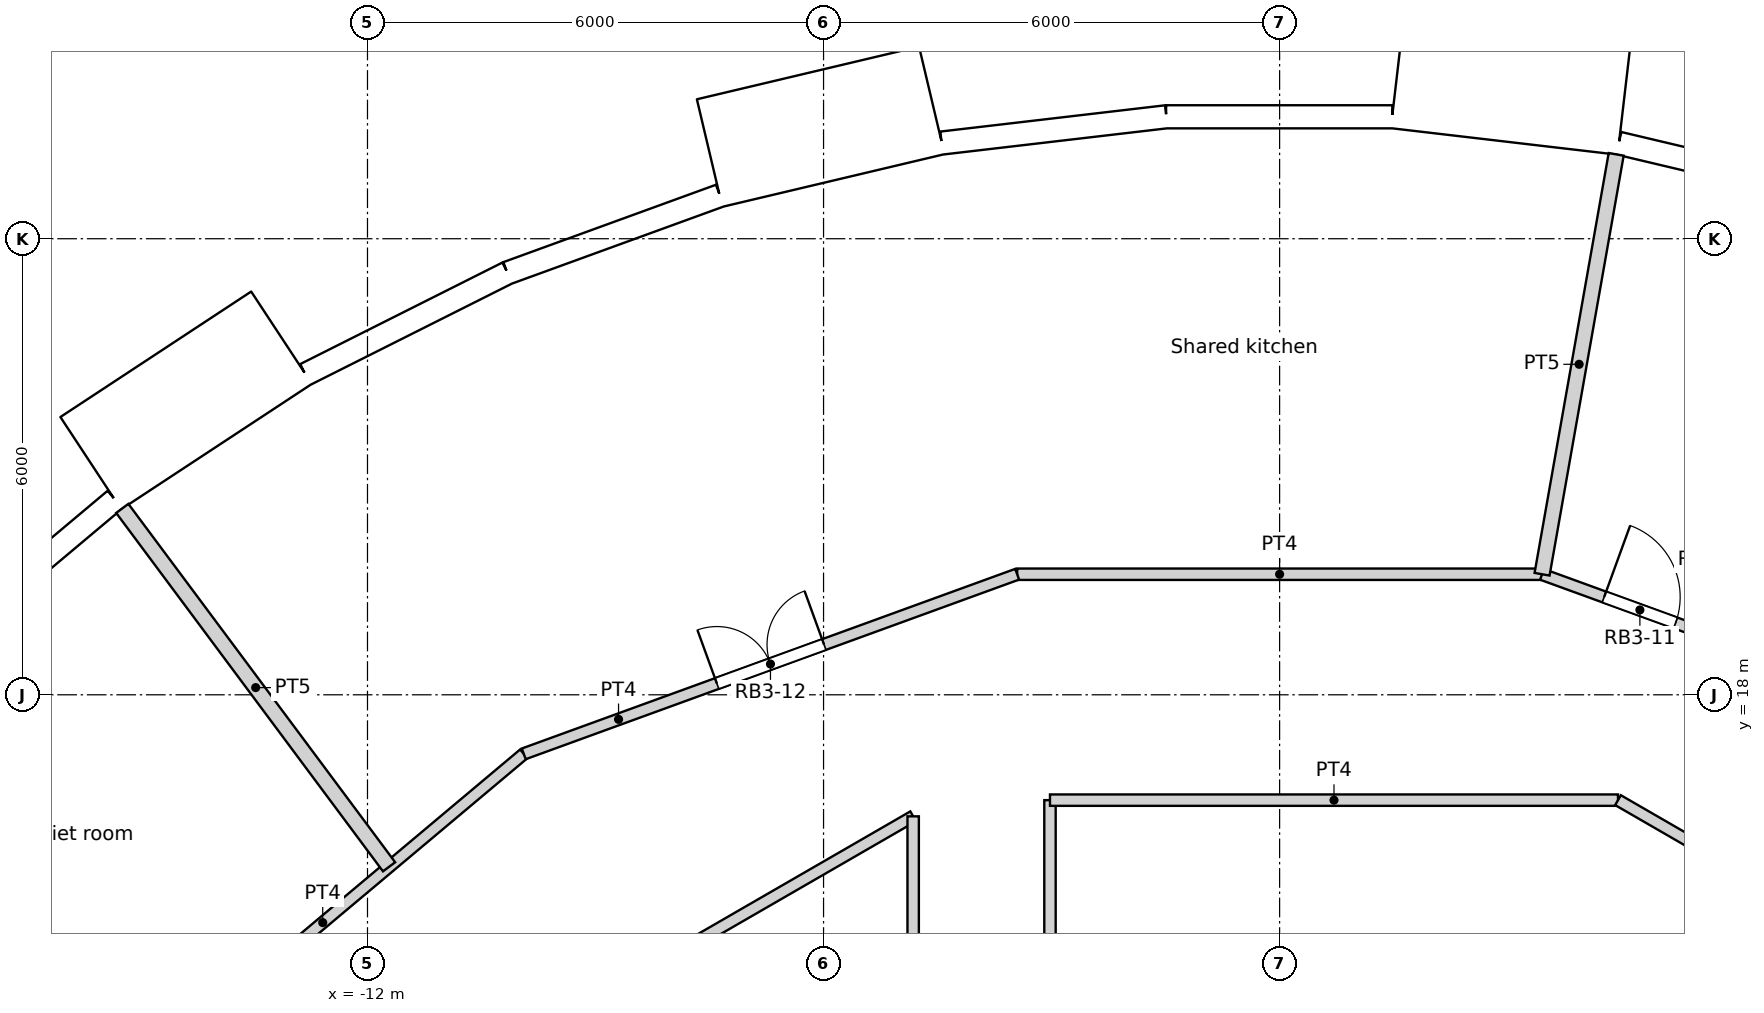
"""IFC4 building model, lengths in metres.
Left out: names, types, materials, properties, quantities, classifications, styles, units other than length and angle.
Written with IfcOpenShell. Run it as: python <this file> out.ifc"""

import sys

from ifc_helpers import new_model, si_unit, direction, frame, frame_2d, origin, origin_2d, place, context, subcontext, project, spatial, rectangle, circle, extrude, element, fill, save


model = new_model("IFC4")
c1 = context("Model", 3, precision=1e-05, world=origin(), true_north=direction((0.0, 1.0)))
c2 = subcontext(c1, "Body", "Model", "MODEL_VIEW")
j1 = project(units=[si_unit("LENGTHUNIT", "METRE"), si_unit("PLANEANGLEUNIT", "RADIAN")], contexts=[c1])
p1 = place(None, origin())
s1 = spatial("IfcSite", under=j1, at=p1, CompositionType="ELEMENT")
p2 = place(p1, origin())
s2 = spatial("IfcBuilding", under=s1, at=p2, CompositionType="ELEMENT")
p3 = place(p2, frame((0.0, 0.0, 147.6)))
s3 = spatial("IfcBuildingStorey", under=s2, at=p3, CompositionType="ELEMENT", Elevation=147.6)
for number, where, z_axis, x_axis in (
    (1, (4.263, 24.175, 0.0), (0.0, 0.0, 1.0), (1.0, 0.0, 0.0)),
    (2, (-1.427, 24.506, 0.0), (0.0, 0.0, 1.0), (1.0, 0.0, 0.0)),
    (3, (-7.04, 23.516, 0.0), (0.0, 0.0, 1.0), (1.0, 0.0, 0.0)),
    (4, (-12.274, 21.259, 0.0), (0.0, 0.0, 1.0), (1.0, 0.0, 0.0)),
):
    element("IfcColumn", number, at=place(p3, frame(where, z_axis=z_axis, x_axis=x_axis)), inside=s3, PredefinedType="COLUMN", context=c2, shape_type="SweptSolid", body=[
        extrude(circle(Radius=0.6, at=origin_2d()), origin(), (0.0, 0.0, 1.0), 3.6),
    ])
for number, where, z_axis, x_axis in (
    (5, (1.406, 18.77, 0.0), (0.0, 0.0, 1.0), (1.0, 0.0, 0.0)),
    (6, (-4.188, 18.35, 0.0), (0.0, 0.0, 1.0), (1.0, 0.0, 0.0)),
    (7, (-9.411, 16.301, 0.0), (0.0, 0.0, 1.0), (1.0, 0.0, 0.0)),
):
    element("IfcColumn", number, at=place(p3, frame(where, z_axis=z_axis, x_axis=x_axis)), inside=s3, PredefinedType="COLUMN", context=c2, shape_type="SweptSolid", body=[
        extrude(circle(Radius=0.65, at=origin_2d()), origin(), (0.0, 0.0, 1.0), 3.6),
    ])
p4 = place(p3, frame((7.356, 24.57, 0.0), z_axis=(0.0, 0.0, 1.0), x_axis=(-0.973045378923, 0.230613725862, 0.0)))
e8 = element("IfcWall", 8, at=p4, inside=s3, PredefinedType="SOLIDWALL", context=c2, shape_type="SweptSolid", body=[
    extrude(rectangle(XDim=2.973, YDim=0.3, at=frame_2d((1.486, 0.0))), origin(), (0.0, 0.0, 1.0), 3.3),
])
p5 = place(p4, frame((1.486, 0.0, 1.55)))
e9 = element("IfcOpeningElement", 9, at=p5, cuts=e8, PredefinedType="OPENING", context=c2, shape_type="SweptSolid", body=[
    extrude(circle(Radius=0.9, at=origin_2d()), frame((0.0, 0.16, 0.0), z_axis=(0.0, -1.0, 0.0), x_axis=(1.0, 0.0, 0.0)), (0.0, 0.0, 1.0), 0.32),
])
p6 = place(p3, frame((4.529, 25.828, -0.3), z_axis=(0.0, 0.0, 1.0), x_axis=(-0.9932342274, 0.116128246006, 0.0)))
e10 = element("IfcWall", 10, at=p6, inside=s3, PredefinedType="ELEMENTEDWALL", context=c2, shape_type="SweptSolid", body=[
    extrude(rectangle(XDim=3.0, YDim=1.45, at=frame_2d((1.5, 0.0))), origin(), (0.0, 0.0, 1.0), 3.6),
])
p7 = place(p6, frame((1.5, 0.0, 1.85)))
e11 = element("IfcOpeningElement", 11, at=p7, cuts=e10, PredefinedType="OPENING", context=c2, shape_type="SweptSolid", body=[
    extrude(circle(Radius=0.9, at=origin_2d()), frame((0.0, 0.735, 0.0), z_axis=(0.0, -1.0, 0.0), x_axis=(1.0, 0.0, 0.0)), (0.0, 0.0, 1.0), 1.47),
])
p8 = place(p3, frame((1.482, 25.604, 0.0), z_axis=(0.0, 0.0, 1.0), x_axis=(-1.0, 0.0, 0.0)))
e12 = element("IfcWall", 12, at=p8, inside=s3, PredefinedType="SOLIDWALL", context=c2, shape_type="SweptSolid", body=[
    extrude(rectangle(XDim=2.973, YDim=0.3, at=frame_2d((1.486, 0.0))), origin(), (0.0, 0.0, 1.0), 3.3),
])
p9 = place(p8, frame((1.486, 0.0, 1.55)))
e13 = element("IfcOpeningElement", 13, at=p9, cuts=e12, PredefinedType="OPENING", context=c2, shape_type="SweptSolid", body=[
    extrude(circle(Radius=0.9, at=origin_2d()), frame((0.0, 0.16, 0.0), z_axis=(0.0, -1.0, 0.0), x_axis=(1.0, 0.0, 0.0)), (0.0, 0.0, 1.0), 0.32),
])
p10 = place(p3, frame((-1.491, 25.604, 0.0), z_axis=(0.0, 0.0, 1.0), x_axis=(-0.993245010522, -0.1160359818, 0.0)))
e14 = element("IfcWall", 14, at=p10, inside=s3, PredefinedType="SOLIDWALL", context=c2, shape_type="SweptSolid", body=[
    extrude(rectangle(XDim=2.973, YDim=0.3, at=frame_2d((1.486, 0.0))), origin(), (0.0, 0.0, 1.0), 3.3),
])
p11 = place(p10, frame((1.486, 0.0, 1.55)))
e15 = element("IfcOpeningElement", 15, at=p11, cuts=e14, PredefinedType="OPENING", context=c2, shape_type="SweptSolid", body=[
    extrude(circle(Radius=0.9, at=origin_2d()), frame((0.0, 0.16, 0.0), z_axis=(0.0, -1.0, 0.0), x_axis=(1.0, 0.0, 0.0)), (0.0, 0.0, 1.0), 0.32),
])
p12 = place(p3, frame((-4.578, 25.819, -0.3), z_axis=(0.0, 0.0, 1.0), x_axis=(-0.973042333261, -0.23062657627, 0.0)))
e16 = element("IfcWall", 16, at=p12, inside=s3, PredefinedType="ELEMENTEDWALL", context=c2, shape_type="SweptSolid", body=[
    extrude(rectangle(XDim=3.0, YDim=1.45, at=frame_2d((1.5, 0.0))), origin(), (0.0, 0.0, 1.0), 3.6),
])
p13 = place(p12, frame((1.5, 0.0, 1.85)))
e17 = element("IfcOpeningElement", 17, at=p13, cuts=e16, PredefinedType="OPENING", context=c2, shape_type="SweptSolid", body=[
    extrude(circle(Radius=0.9, at=origin_2d()), frame((0.0, 0.735, 0.0), z_axis=(0.0, -1.0, 0.0), x_axis=(1.0, 0.0, 0.0)), (0.0, 0.0, 1.0), 1.47),
])
p14 = place(p3, frame((-7.365, 24.567, 0.0), z_axis=(0.0, 0.0, 1.0), x_axis=(-0.939690282133, -0.342026568652, 0.0)))
e18 = element("IfcWall", 18, at=p14, inside=s3, PredefinedType="SOLIDWALL", context=c2, shape_type="SweptSolid", body=[
    extrude(rectangle(XDim=2.973, YDim=0.3, at=frame_2d((1.486, 0.0))), origin(), (0.0, 0.0, 1.0), 3.3),
])
p15 = place(p14, frame((1.486, 0.0, 1.55)))
e19 = element("IfcOpeningElement", 19, at=p15, cuts=e18, PredefinedType="OPENING", context=c2, shape_type="SweptSolid", body=[
    extrude(circle(Radius=0.9, at=origin_2d()), frame((0.0, 0.16, 0.0), z_axis=(0.0, -1.0, 0.0), x_axis=(1.0, 0.0, 0.0)), (0.0, 0.0, 1.0), 0.32),
])
p16 = place(p3, frame((-10.158, 23.55, 0.0), z_axis=(0.0, 0.0, 1.0), x_axis=(-0.893637442555, -0.448789618045, 0.0)))
e20 = element("IfcWall", 20, at=p16, inside=s3, PredefinedType="SOLIDWALL", context=c2, shape_type="SweptSolid", body=[
    extrude(rectangle(XDim=2.973, YDim=0.3, at=frame_2d((1.486, 0.0))), origin(), (0.0, 0.0, 1.0), 3.3),
])
p17 = place(p16, frame((1.486, 0.0, 1.55)))
e21 = element("IfcOpeningElement", 21, at=p17, cuts=e20, PredefinedType="OPENING", context=c2, shape_type="SweptSolid", body=[
    extrude(circle(Radius=0.9, at=origin_2d()), frame((0.0, 0.16, 0.0), z_axis=(0.0, -1.0, 0.0), x_axis=(1.0, 0.0, 0.0)), (0.0, 0.0, 1.0), 0.32),
])
p18 = place(p3, frame((-13.132, 22.697, -0.3), z_axis=(0.0, 0.0, 1.0), x_axis=(-0.835514416706, -0.549468524554, 0.0)))
e22 = element("IfcWall", 22, at=p18, inside=s3, PredefinedType="ELEMENTEDWALL", context=c2, shape_type="SweptSolid", body=[
    extrude(rectangle(XDim=3.0, YDim=1.45, at=frame_2d((1.5, 0.0))), origin(), (0.0, 0.0, 1.0), 3.6),
])
p19 = place(p18, frame((1.5, 0.0, 1.85)))
e23 = element("IfcOpeningElement", 23, at=p19, cuts=e22, PredefinedType="OPENING", context=c2, shape_type="SweptSolid", body=[
    extrude(circle(Radius=0.9, at=origin_2d()), frame((0.0, 0.735, 0.0), z_axis=(0.0, -1.0, 0.0), x_axis=(1.0, 0.0, 0.0)), (0.0, 0.0, 1.0), 1.47),
])
p20 = place(p3, frame((-15.323, 20.566, 0.0), z_axis=(0.0, 0.0, 1.0), x_axis=(-0.766049350637, -0.642781761089, 0.0)))
e24 = element("IfcWall", 24, at=p20, inside=s3, PredefinedType="SOLIDWALL", context=c2, shape_type="SweptSolid", body=[
    extrude(rectangle(XDim=2.973, YDim=0.3, at=frame_2d((1.486, 0.0))), origin(), (0.0, 0.0, 1.0), 3.3),
])
p21 = place(p20, frame((1.486, 0.0, 1.55)))
e25 = element("IfcOpeningElement", 25, at=p21, cuts=e24, PredefinedType="OPENING", context=c2, shape_type="SweptSolid", body=[
    extrude(circle(Radius=0.9, at=origin_2d()), frame((0.0, 0.16, 0.0), z_axis=(0.0, -1.0, 0.0), x_axis=(1.0, 0.0, 0.0)), (0.0, 0.0, 1.0), 0.32),
])
p22 = place(p3, frame((-4.821, 10.3, 0.0), z_axis=(0.0, 0.0, 1.0), x_axis=(0.0, 1.0, 0.0)))
e26 = element("IfcWall", 26, at=p22, inside=s3, PredefinedType="PARTITIONING", context=c2, shape_type="SweptSolid", body=[
    extrude(rectangle(XDim=6.101, YDim=0.15, at=frame_2d((3.05, 0.0))), origin(), (0.0, 0.0, 1.0), 3.3),
])
p23 = place(p3, frame((-12.162, 12.162, 0.0), z_axis=(0.0, 0.0, 1.0), x_axis=(0.866004766557, 0.500035743023, 0.0)))
e27 = element("IfcWall", 27, at=p23, inside=s3, PredefinedType="PARTITIONING", context=c2, shape_type="SweptSolid", body=[
    extrude(rectangle(XDim=8.477, YDim=0.15, at=frame_2d((4.239, 0.0))), origin(), (0.0, 0.0, 1.0), 3.3),
])
p24 = place(p23, frame((3.739, 0.0, 0.0)))
e28 = element("IfcOpeningElement", 28, at=p24, cuts=e27, PredefinedType="OPENING", context=c2, shape_type="SweptSolid", body=[
    extrude(rectangle(XDim=1.0, YDim=2.04, at=frame_2d((0.5, 1.02))), frame((0.0, 0.075, 0.0), z_axis=(0.0, -1.0, 0.0), x_axis=(1.0, 0.0, 0.0)), (0.0, 0.0, 1.0), 0.15),
])
p25 = place(p3, frame((4.452, 16.614, 0.0), z_axis=(0.0, 0.0, 1.0), x_axis=(0.866005203721, -0.500034985904, 0.0)))
e29 = element("IfcWall", 29, at=p25, inside=s3, PredefinedType="PARTITIONING", context=c2, shape_type="SweptSolid", body=[
    extrude(rectangle(XDim=8.903, YDim=0.15, at=frame_2d((4.452, 0.0))), origin(), (0.0, 0.0, 1.0), 3.3),
])
p26 = place(p3, frame((-3.021, 16.614, 0.0), z_axis=(0.0, 0.0, 1.0), x_axis=(1.0, 0.0, 0.0)))
e30 = element("IfcWall", 30, at=p26, inside=s3, PredefinedType="PARTITIONING", context=c2, shape_type="SweptSolid", body=[
    extrude(rectangle(XDim=7.473, YDim=0.15, at=frame_2d((3.736, 0.0))), origin(), (0.0, 0.0, 1.0), 3.3),
])
p27 = place(p3, frame((-3.021, 10.3, 0.0), z_axis=(0.0, 0.0, 1.0), x_axis=(0.0, 1.0, 0.0)))
e31 = element("IfcWall", 31, at=p27, inside=s3, PredefinedType="PARTITIONING", context=c2, shape_type="SweptSolid", body=[
    extrude(rectangle(XDim=6.314, YDim=0.15, at=frame_2d((3.157, 0.0))), origin(), (0.0, 0.0, 1.0), 3.3),
])
p28 = place(p3, frame((3.452, 19.585, 0.0), z_axis=(0.0, 0.0, 1.0), x_axis=(0.939737689664, -0.341896292208, 0.0)))
e32 = element("IfcWall", 32, at=p28, inside=s3, PredefinedType="PARTITIONING", context=c2, shape_type="SweptSolid", body=[
    extrude(rectangle(XDim=6.908, YDim=0.15, at=frame_2d((3.454, 0.0))), origin(), (0.0, 0.0, 1.0), 3.3),
])
p29 = place(p28, frame((5.249, 0.0, 0.0)))
e33 = element("IfcOpeningElement", 33, at=p29, cuts=e32, PredefinedType="OPENING", context=c2, shape_type="SweptSolid", body=[
    extrude(rectangle(XDim=1.0, YDim=2.1, at=frame_2d((0.5, 1.05))), frame((0.0, 0.075, 0.0), z_axis=(0.0, -1.0, 0.0), x_axis=(1.0, 0.0, 0.0)), (0.0, 0.0, 1.0), 0.15),
])
p30 = place(p28, frame((0.87, 0.0, 0.0)))
e34 = element("IfcOpeningElement", 34, at=p30, cuts=e32, PredefinedType="OPENING", context=c2, shape_type="SweptSolid", body=[
    extrude(rectangle(XDim=1.0, YDim=2.1, at=frame_2d((0.5, 1.05))), frame((0.0, 0.075, 0.0), z_axis=(0.0, -1.0, 0.0), x_axis=(1.0, 0.0, 0.0)), (0.0, 0.0, 1.0), 0.15),
])
p31 = place(p3, frame((-15.234, 12.783, 0.0), z_axis=(0.0, 0.0, 1.0), x_axis=(0.765936018543, 0.642916802937, 0.0)))
e35 = element("IfcWall", 35, at=p31, inside=s3, PredefinedType="PARTITIONING", context=c2, shape_type="SweptSolid", body=[
    extrude(rectangle(XDim=6.906, YDim=0.15, at=frame_2d((3.453, 0.0))), origin(), (0.0, 0.0, 1.0), 3.3),
])
p32 = place(p3, frame((-9.944, 17.223, 0.0), z_axis=(0.0, 0.0, 1.0), x_axis=(0.939672634566, 0.342075050021, 0.0)))
e36 = element("IfcWall", 36, at=p32, inside=s3, PredefinedType="PARTITIONING", context=c2, shape_type="SweptSolid", body=[
    extrude(rectangle(XDim=6.908, YDim=0.15, at=frame_2d((3.454, 0.0))), origin(), (0.0, 0.0, 1.0), 3.3),
])
p33 = place(p32, frame((2.704, 0.0, 0.0)))
e37 = element("IfcOpeningElement", 37, at=p33, cuts=e36, PredefinedType="OPENING", context=c2, shape_type="SweptSolid", body=[
    extrude(rectangle(XDim=1.5, YDim=2.1, at=frame_2d((0.75, 1.05))), frame((0.0, 0.075, 0.0), z_axis=(0.0, -1.0, 0.0), x_axis=(1.0, 0.0, 0.0)), (0.0, 0.0, 1.0), 0.15),
])
p34 = place(p3, frame((-3.453, 19.586, 0.0), z_axis=(0.0, 0.0, 1.0), x_axis=(1.0, 0.0, 0.0)))
e38 = element("IfcWall", 38, at=p34, inside=s3, PredefinedType="PARTITIONING", context=c2, shape_type="SweptSolid", body=[
    extrude(rectangle(XDim=6.906, YDim=0.15, at=frame_2d((3.453, 0.0))), origin(), (0.0, 0.0, 1.0), 3.3),
])
p35 = place(p3, frame((3.453, 19.586, 0.0), z_axis=(0.0, 0.0, 1.0), x_axis=(0.17382754149, 0.984776109489, 0.0)))
e39 = element("IfcWall", 39, at=p35, inside=s3, PredefinedType="PARTITIONING", context=c2, shape_type="SweptSolid", body=[
    extrude(rectangle(XDim=5.61, YDim=0.2, at=frame_2d((2.805, 0.0))), origin(), (0.0, 0.0, 1.0), 3.3),
])
p36 = place(p3, frame((-15.226, 20.452, 0.0), z_axis=(0.0, 0.0, 1.0), x_axis=(0.597151875745, -0.802128192557, 0.0)))
e40 = element("IfcWall", 40, at=p36, inside=s3, PredefinedType="PARTITIONING", context=c2, shape_type="SweptSolid", body=[
    extrude(rectangle(XDim=5.878, YDim=0.2, at=frame_2d((2.939, 0.0))), origin(), (0.0, 0.0, 1.0), 3.3),
])
p37 = place(p5, origin())
e41 = element("IfcWindow", 41, at=p37, inside=s3, PartitioningType="SINGLE_PANEL", PredefinedType="WINDOW", context=c2, shape_type="SweptSolid", body=[
    extrude(circle(Radius=0.9, at=origin_2d()), frame((0.0, 0.12, 0.0), z_axis=(0.0, -1.0, 0.0), x_axis=(1.0, 0.0, 0.0)), (0.0, 0.0, 1.0), 0.1),
])
fill(e9, e41)
p38 = place(p7, origin())
e42 = element("IfcWindow", 42, at=p38, inside=s3, PartitioningType="SINGLE_PANEL", PredefinedType="WINDOW", context=c2, shape_type="SweptSolid", body=[
    extrude(circle(Radius=0.9, at=origin_2d()), frame((0.0, 0.695, 0.0), z_axis=(0.0, -1.0, 0.0), x_axis=(1.0, 0.0, 0.0)), (0.0, 0.0, 1.0), 0.1),
])
fill(e11, e42)
p39 = place(p9, origin())
e43 = element("IfcWindow", 43, at=p39, inside=s3, PartitioningType="SINGLE_PANEL", PredefinedType="WINDOW", context=c2, shape_type="SweptSolid", body=[
    extrude(circle(Radius=0.9, at=origin_2d()), frame((0.0, 0.12, 0.0), z_axis=(0.0, -1.0, 0.0), x_axis=(1.0, 0.0, 0.0)), (0.0, 0.0, 1.0), 0.1),
])
fill(e13, e43)
p40 = place(p11, origin())
e44 = element("IfcWindow", 44, at=p40, inside=s3, PartitioningType="SINGLE_PANEL", PredefinedType="WINDOW", context=c2, shape_type="SweptSolid", body=[
    extrude(circle(Radius=0.9, at=origin_2d()), frame((0.0, 0.12, 0.0), z_axis=(0.0, -1.0, 0.0), x_axis=(1.0, 0.0, 0.0)), (0.0, 0.0, 1.0), 0.1),
])
fill(e15, e44)
p41 = place(p13, origin())
e45 = element("IfcWindow", 45, at=p41, inside=s3, PartitioningType="SINGLE_PANEL", PredefinedType="WINDOW", context=c2, shape_type="SweptSolid", body=[
    extrude(circle(Radius=0.9, at=origin_2d()), frame((0.0, 0.695, 0.0), z_axis=(0.0, -1.0, 0.0), x_axis=(1.0, 0.0, 0.0)), (0.0, 0.0, 1.0), 0.1),
])
fill(e17, e45)
p42 = place(p15, origin())
e46 = element("IfcWindow", 46, at=p42, inside=s3, PartitioningType="SINGLE_PANEL", PredefinedType="WINDOW", context=c2, shape_type="SweptSolid", body=[
    extrude(circle(Radius=0.9, at=origin_2d()), frame((0.0, 0.12, 0.0), z_axis=(0.0, -1.0, 0.0), x_axis=(1.0, 0.0, 0.0)), (0.0, 0.0, 1.0), 0.1),
])
fill(e19, e46)
p43 = place(p17, origin())
e47 = element("IfcWindow", 47, at=p43, inside=s3, PartitioningType="SINGLE_PANEL", PredefinedType="WINDOW", context=c2, shape_type="SweptSolid", body=[
    extrude(circle(Radius=0.9, at=origin_2d()), frame((0.0, 0.12, 0.0), z_axis=(0.0, -1.0, 0.0), x_axis=(1.0, 0.0, 0.0)), (0.0, 0.0, 1.0), 0.1),
])
fill(e21, e47)
p44 = place(p19, origin())
e48 = element("IfcWindow", 48, at=p44, inside=s3, PartitioningType="SINGLE_PANEL", PredefinedType="WINDOW", context=c2, shape_type="SweptSolid", body=[
    extrude(circle(Radius=0.9, at=origin_2d()), frame((0.0, 0.695, 0.0), z_axis=(0.0, -1.0, 0.0), x_axis=(1.0, 0.0, 0.0)), (0.0, 0.0, 1.0), 0.1),
])
fill(e23, e48)
p45 = place(p21, origin())
e49 = element("IfcWindow", 49, at=p45, inside=s3, PartitioningType="SINGLE_PANEL", PredefinedType="WINDOW", context=c2, shape_type="SweptSolid", body=[
    extrude(circle(Radius=0.9, at=origin_2d()), frame((0.0, 0.12, 0.0), z_axis=(0.0, -1.0, 0.0), x_axis=(1.0, 0.0, 0.0)), (0.0, 0.0, 1.0), 0.1),
])
fill(e25, e49)
p46 = place(p30, origin())
e50 = element("IfcDoor", 50, at=p46, inside=s3, OperationType="SINGLE_SWING_LEFT", PredefinedType="DOOR", context=c2, shape_type="SweptSolid", body=[
    extrude(rectangle(XDim=1.0, YDim=2.1, at=frame_2d((0.5, 1.05))), frame((0.0, 0.025, 0.0), z_axis=(0.0, -1.0, 0.0), x_axis=(1.0, 0.0, 0.0)), (0.0, 0.0, 1.0), 0.05),
])
fill(e34, e50)
p47 = place(p33, origin())
e51 = element("IfcDoor", 51, at=p47, inside=s3, OperationType="DOUBLE_DOOR_SINGLE_SWING", PredefinedType="DOOR", context=c2, shape_type="SweptSolid", body=[
    extrude(rectangle(XDim=1.5, YDim=2.1, at=frame_2d((0.75, 1.05))), frame((0.0, 0.025, 0.0), z_axis=(0.0, -1.0, 0.0), x_axis=(1.0, 0.0, 0.0)), (0.0, 0.0, 1.0), 0.05),
])
fill(e37, e51)
save(model, sys.argv[1])
